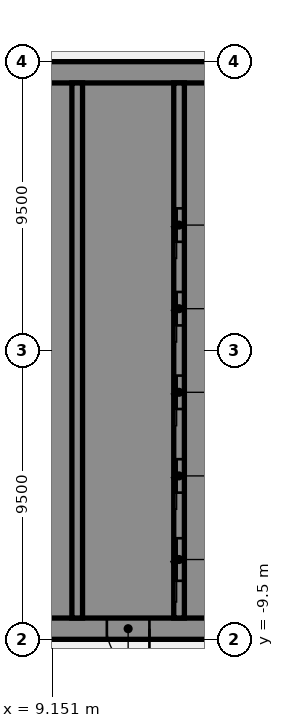
"""IFC4 building model, lengths in metres.
Left out: names, types, materials, properties, quantities, classifications, styles, units other than length and angle.
Written with IfcOpenShell. Run it as: python <this file> out.ifc"""

import sys

from ifc_helpers import new_model, si_unit, direction, frame, frame_2d, origin, place, context, subcontext, project, spatial, polyline, rectangle, outline, extrude, element, fill, save


model = new_model("IFC4")
c1 = context("Model", 3, precision=1e-05, world=origin(), true_north=direction((0.0, 1.0)))
c2 = subcontext(c1, "Body", "Model", "MODEL_VIEW")
j1 = project(units=[si_unit("LENGTHUNIT", "METRE"), si_unit("PLANEANGLEUNIT", "RADIAN")], contexts=[c1])
p1 = place(None, origin())
s1 = spatial("IfcSite", under=j1, at=p1, CompositionType="ELEMENT")
p2 = place(p1, origin())
s2 = spatial("IfcBuilding", under=s1, at=p2, CompositionType="ELEMENT")
p3 = place(p2, frame((0.0, 0.0, -7.0)))
s3 = spatial("IfcBuildingStorey", under=s2, at=p3, CompositionType="ELEMENT", Elevation=-7.0)
p4 = place(p3, frame((16.5, -9.15, 0.0), z_axis=(0.0, 0.0, 1.0), x_axis=(-1.0, 0.0, 0.0)))
e1 = element("IfcWall", 1, at=p4, inside=s3, PredefinedType="SHEAR", context=c2, shape_type="SweptSolid", body=[
    extrude(rectangle(XDim=13.0, YDim=0.7, at=frame_2d((6.5, 0.0))), origin(), (0.0, 0.0, 1.0), 6.45),
])
p5 = place(p4, frame((4.15, 0.0, 0.0)))
e2 = element("IfcOpeningElement", 2, at=p5, cuts=e1, PredefinedType="OPENING", context=c2, shape_type="SweptSolid", body=[
    extrude(rectangle(XDim=1.4, YDim=2.1, at=frame_2d((0.7, 1.05))), frame((0.0, 0.36, 0.0), z_axis=(0.0, -1.0, 0.0), x_axis=(1.0, 0.0, 0.0)), (0.0, 0.0, 1.0), 0.72),
])
p6 = place(p4, frame((10.125, 0.0, 0.0)))
e3 = element("IfcOpeningElement", 3, at=p6, cuts=e1, PredefinedType="OPENING", context=c2, shape_type="SweptSolid", body=[
    extrude(rectangle(XDim=1.4, YDim=2.1, at=frame_2d((0.7, 1.05))), frame((0.0, 0.36, 0.0), z_axis=(0.0, -1.0, 0.0), x_axis=(1.0, 0.0, 0.0)), (0.0, 0.0, 1.0), 0.72),
])
p7 = place(p3, origin())
e4 = element("IfcWall", 4, at=p7, inside=s3, PredefinedType="SHEAR", context=c2, shape_type="SweptSolid", body=[
    extrude(outline(polyline([(13.5, -8.8), (15.8, -8.8), (16.5, -8.8), (16.5, 8.8), (15.8, 8.8), (13.5, 8.8), (13.5, 8.125), (15.8, 8.125), (15.8, 5.625), (13.5, 5.625), (13.5, 5.375), (15.8, 5.375), (15.8, 2.875), (13.5, 2.875), (13.5, 2.625), (15.8, 2.625), (15.8, 0.125), (13.5, 0.125), (13.5, -0.125), (15.8, -0.125), (15.8, -2.625), (13.5, -2.625), (13.5, -2.875), (15.8, -2.875), (15.8, -5.375), (13.5, -5.375), (13.5, -5.625), (15.8, -5.625), (15.8, -8.125), (13.5, -8.125), (13.5, -8.8)])), origin(), (0.0, 0.0, 1.0), 6.45),
])
p8 = place(p3, frame((16.5, 9.15, 0.0), z_axis=(0.0, 0.0, 1.0), x_axis=(-1.0, 0.0, 0.0)))
e5 = element("IfcWall", 5, at=p8, inside=s3, PredefinedType="SHEAR", context=c2, shape_type="SweptSolid", body=[
    extrude(rectangle(XDim=13.0, YDim=0.7, at=frame_2d((6.5, 0.0))), origin(), (0.0, 0.0, 1.0), 6.45),
])
p9 = place(p3, origin())
e6 = element("IfcWall", 6, at=p9, inside=s3, PredefinedType="SHEAR", context=c2, shape_type="SweptSolid", body=[
    extrude(outline(polyline([(9.8, -5.375), (7.5, -5.375), (7.5, -2.875), (9.8, -2.875), (9.8, -2.625), (7.5, -2.625), (7.5, -0.125), (9.8, -0.125), (9.8, 0.125), (7.5, 0.125), (7.5, 2.625), (9.8, 2.625), (9.8, 2.875), (7.5, 2.875), (7.5, 5.375), (9.8, 5.375), (9.8, 5.625), (7.5, 5.625), (7.5, 8.125), (9.8, 8.125), (9.8, 8.8), (7.5, 8.8), (7.15, 8.8), (7.15, -5.625), (7.5, -5.625), (9.8, -5.625), (9.8, -5.375)])), origin(), (0.0, 0.0, 1.0), 6.45),
])
p10 = place(p3, origin())
e7 = element("IfcWall", 7, at=p10, inside=s3, PredefinedType="SHEAR", context=c2, shape_type="SweptSolid", body=[
    extrude(outline(polyline([(7.5, -8.125), (7.5, -8.8), (9.8, -8.8), (9.8, -8.125), (9.8, -5.625), (9.55, -5.625), (9.55, -8.125), (7.5, -8.125)])), origin(), (0.0, 0.0, 1.0), 6.45),
])
p11 = place(p3, frame((13.325, -8.8, 0.0), z_axis=(0.0, 0.0, 1.0), x_axis=(0.0, 1.0, 0.0)))
e8 = element("IfcWall", 8, at=p11, inside=s3, PredefinedType="SHEAR", context=c2, shape_type="SweptSolid", body=[
    extrude(rectangle(XDim=17.6, YDim=0.35, at=frame_2d((8.8, 0.0))), origin(), (0.0, 0.0, 1.0), 6.45),
])
p12 = place(p11, frame((1.225, 0.0, 0.0)))
e9 = element("IfcOpeningElement", 9, at=p12, cuts=e8, PredefinedType="OPENING", context=c2, shape_type="SweptSolid", body=[
    extrude(rectangle(XDim=1.4, YDim=2.1, at=frame_2d((0.7, 1.05))), frame((0.0, 0.185, 0.0), z_axis=(0.0, -1.0, 0.0), x_axis=(1.0, 0.0, 0.0)), (0.0, 0.0, 1.0), 0.37),
])
p13 = place(p11, frame((4.125, 0.0, 0.0)))
e10 = element("IfcOpeningElement", 10, at=p13, cuts=e8, PredefinedType="OPENING", context=c2, shape_type="SweptSolid", body=[
    extrude(rectangle(XDim=1.1, YDim=2.1, at=frame_2d((0.55, 1.05))), frame((0.0, 0.185, 0.0), z_axis=(0.0, -1.0, 0.0), x_axis=(1.0, 0.0, 0.0)), (0.0, 0.0, 1.0), 0.37),
])
p14 = place(p11, frame((6.875, 0.0, 0.0)))
e11 = element("IfcOpeningElement", 11, at=p14, cuts=e8, PredefinedType="OPENING", context=c2, shape_type="SweptSolid", body=[
    extrude(rectangle(XDim=1.1, YDim=2.1, at=frame_2d((0.55, 1.05))), frame((0.0, 0.185, 0.0), z_axis=(0.0, -1.0, 0.0), x_axis=(1.0, 0.0, 0.0)), (0.0, 0.0, 1.0), 0.37),
])
p15 = place(p11, frame((9.625, 0.0, 0.0)))
e12 = element("IfcOpeningElement", 12, at=p15, cuts=e8, PredefinedType="OPENING", context=c2, shape_type="SweptSolid", body=[
    extrude(rectangle(XDim=1.1, YDim=2.1, at=frame_2d((0.55, 1.05))), frame((0.0, 0.185, 0.0), z_axis=(0.0, -1.0, 0.0), x_axis=(1.0, 0.0, 0.0)), (0.0, 0.0, 1.0), 0.37),
])
p16 = place(p11, frame((12.375, 0.0, 0.0)))
e13 = element("IfcOpeningElement", 13, at=p16, cuts=e8, PredefinedType="OPENING", context=c2, shape_type="SweptSolid", body=[
    extrude(rectangle(XDim=1.1, YDim=2.1, at=frame_2d((0.55, 1.05))), frame((0.0, 0.185, 0.0), z_axis=(0.0, -1.0, 0.0), x_axis=(1.0, 0.0, 0.0)), (0.0, 0.0, 1.0), 0.37),
])
p17 = place(p3, frame((9.975, -8.8, 0.0), z_axis=(0.0, 0.0, 1.0), x_axis=(0.0, 1.0, 0.0)))
e14 = element("IfcWall", 14, at=p17, inside=s3, PredefinedType="SHEAR", context=c2, shape_type="SweptSolid", body=[
    extrude(rectangle(XDim=17.6, YDim=0.35, at=frame_2d((8.8, 0.0))), origin(), (0.0, 0.0, 1.0), 6.45),
])
p18 = place(p5, origin())
e15 = element("IfcDoor", 15, at=p18, inside=s3, OperationType="SINGLE_SWING_LEFT", PredefinedType="DOOR", context=c2, shape_type="SweptSolid", body=[
    extrude(rectangle(XDim=1.4, YDim=2.1, at=frame_2d((0.7, 1.05))), frame((0.0, 0.025, 0.0), z_axis=(0.0, -1.0, 0.0), x_axis=(1.0, 0.0, 0.0)), (0.0, 0.0, 1.0), 0.05),
])
fill(e2, e15)
p19 = place(p12, origin())
e16 = element("IfcDoor", 16, at=p19, inside=s3, OperationType="SLIDING_TO_LEFT", PredefinedType="DOOR", context=c2, shape_type="SweptSolid", body=[
    extrude(rectangle(XDim=1.4, YDim=2.1, at=frame_2d((0.7, 1.05))), frame((0.0, 0.025, 0.0), z_axis=(0.0, -1.0, 0.0), x_axis=(1.0, 0.0, 0.0)), (0.0, 0.0, 1.0), 0.05),
])
fill(e9, e16)
p20 = place(p13, origin())
e17 = element("IfcDoor", 17, at=p20, inside=s3, OperationType="SLIDING_TO_LEFT", PredefinedType="DOOR", context=c2, shape_type="SweptSolid", body=[
    extrude(rectangle(XDim=1.1, YDim=2.1, at=frame_2d((0.55, 1.05))), frame((0.0, 0.025, 0.0), z_axis=(0.0, -1.0, 0.0), x_axis=(1.0, 0.0, 0.0)), (0.0, 0.0, 1.0), 0.05),
])
fill(e10, e17)
p21 = place(p14, origin())
e18 = element("IfcDoor", 18, at=p21, inside=s3, OperationType="SLIDING_TO_LEFT", PredefinedType="DOOR", context=c2, shape_type="SweptSolid", body=[
    extrude(rectangle(XDim=1.1, YDim=2.1, at=frame_2d((0.55, 1.05))), frame((0.0, 0.025, 0.0), z_axis=(0.0, -1.0, 0.0), x_axis=(1.0, 0.0, 0.0)), (0.0, 0.0, 1.0), 0.05),
])
fill(e11, e18)
p22 = place(p15, origin())
e19 = element("IfcDoor", 19, at=p22, inside=s3, OperationType="SLIDING_TO_LEFT", PredefinedType="DOOR", context=c2, shape_type="SweptSolid", body=[
    extrude(rectangle(XDim=1.1, YDim=2.1, at=frame_2d((0.55, 1.05))), frame((0.0, 0.025, 0.0), z_axis=(0.0, -1.0, 0.0), x_axis=(1.0, 0.0, 0.0)), (0.0, 0.0, 1.0), 0.05),
])
fill(e12, e19)
p23 = place(p16, origin())
e20 = element("IfcDoor", 20, at=p23, inside=s3, OperationType="SLIDING_TO_LEFT", PredefinedType="DOOR", context=c2, shape_type="SweptSolid", body=[
    extrude(rectangle(XDim=1.1, YDim=2.1, at=frame_2d((0.55, 1.05))), frame((0.0, 0.025, 0.0), z_axis=(0.0, -1.0, 0.0), x_axis=(1.0, 0.0, 0.0)), (0.0, 0.0, 1.0), 0.05),
])
fill(e13, e20)
save(model, sys.argv[1])
